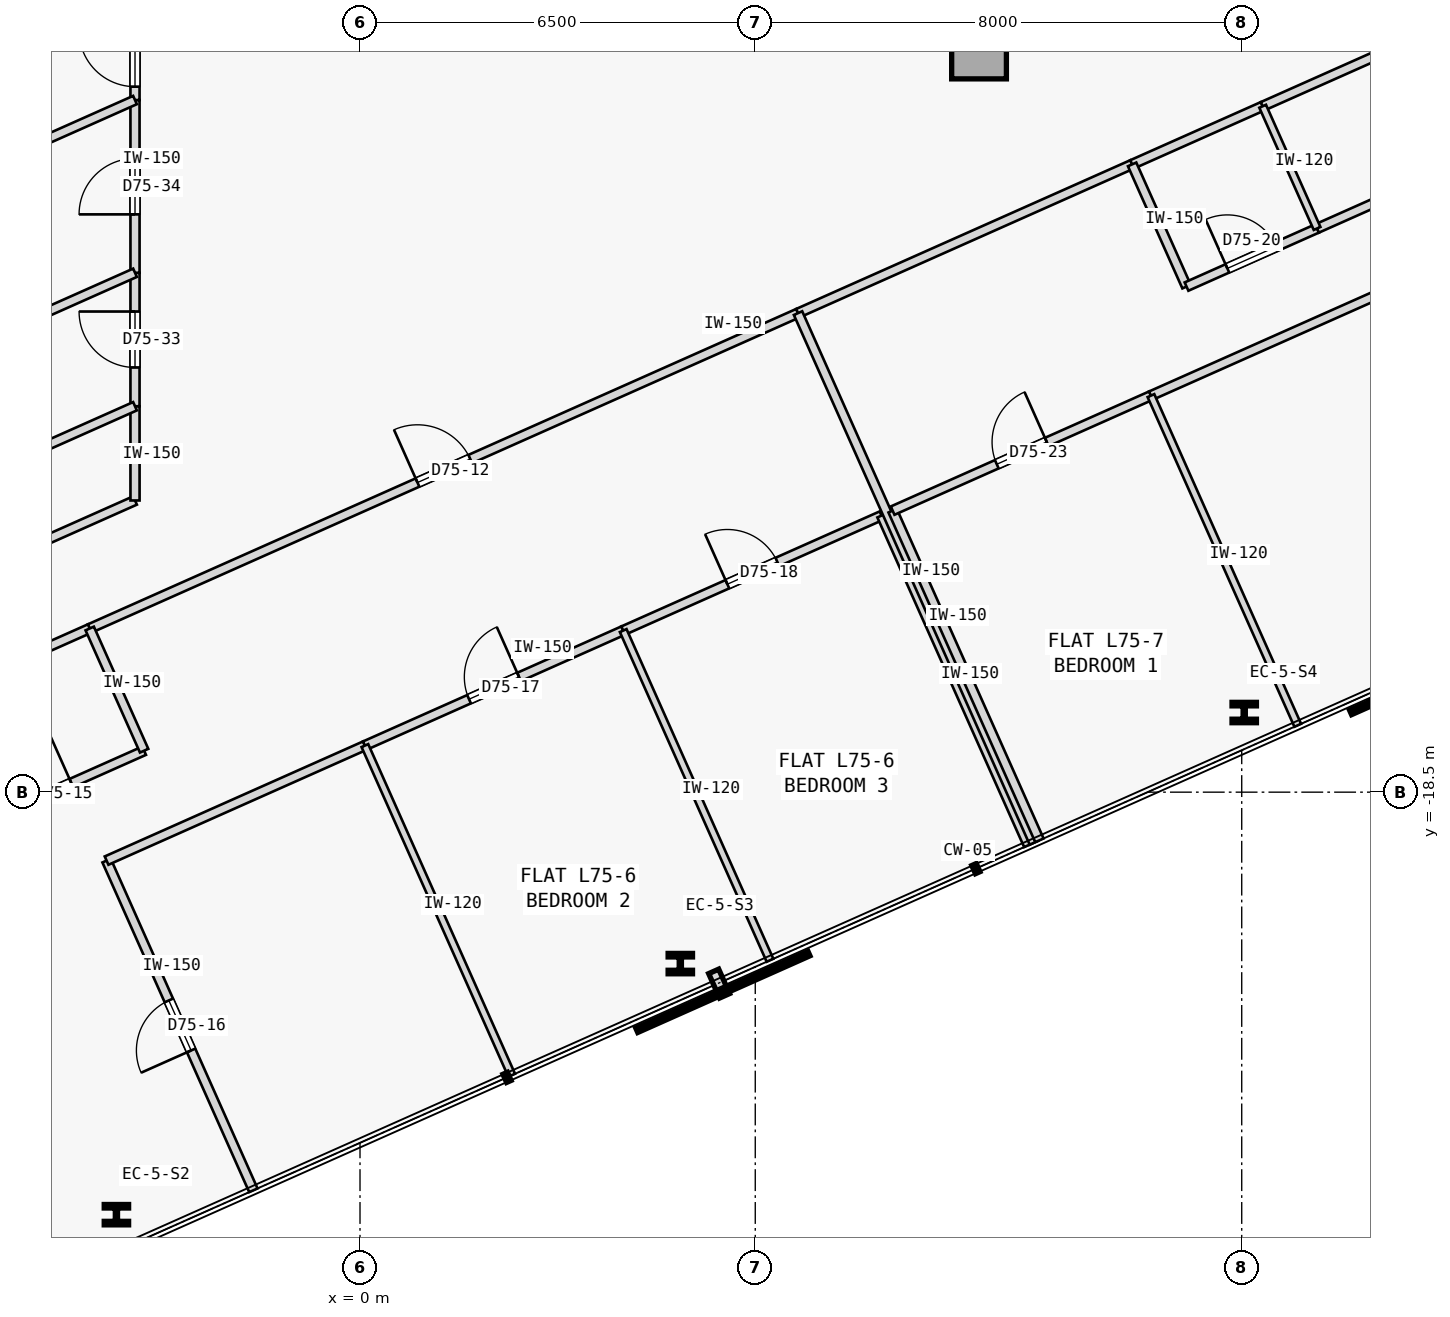
"""IFC4 building model, lengths in metres.
Left out: names, types, materials, properties, quantities, classifications, styles, units other than length and angle.
Written with IfcOpenShell. Run it as: python <this file> out.ifc"""

import sys

from ifc_helpers import new_model, si_unit, direction, frame, frame_2d, origin, origin_2d, place, context, subcontext, project, spatial, rectangle, i_section, extrude, element, fill, save


model = new_model("IFC4")
c1 = context("Model", 3, precision=1e-05, world=origin(), true_north=direction((0.0, 1.0)))
c2 = subcontext(c1, "Body", "Model", "MODEL_VIEW")
j1 = project(units=[si_unit("LENGTHUNIT", "METRE"), si_unit("PLANEANGLEUNIT", "RADIAN")], contexts=[c1])
p1 = place(None, origin())
s1 = spatial("IfcSite", under=j1, at=p1, CompositionType="ELEMENT")
p2 = place(p1, origin())
s2 = spatial("IfcBuilding", under=s1, at=p2, CompositionType="ELEMENT")
p3 = place(p2, frame((0.0, 0.0, 281.9)))
s3 = spatial("IfcBuildingStorey", under=s2, at=p3, CompositionType="ELEMENT", Elevation=281.9)
p4 = place(p3, frame((10.18, -6.32, 0.0), z_axis=(0.0, 0.0, 1.0), x_axis=(1.0, 0.0, 0.0)))
e1 = element("IfcColumn", 1, at=p4, inside=s3, PredefinedType="COLUMN", context=c2, shape_type="SweptSolid", body=[
    extrude(rectangle(XDim=0.9, YDim=0.9, at=origin_2d()), origin(), (0.0, 0.0, 1.0), 3.35),
])
for number, where, z_axis, x_axis in (
    (2, (-4.006, -25.448, 0.0), (0.0, 0.0, 1.0), (1.0, 0.0, 0.0)),
    (3, (5.268, -21.319, 0.0), (0.0, 0.0, 1.0), (1.0, 0.0, 0.0)),
    (4, (14.541, -17.19, 0.0), (0.0, 0.0, 1.0), (1.0, 0.0, 0.0)),
):
    element("IfcColumn", number, at=place(p3, frame(where, z_axis=z_axis, x_axis=x_axis)), inside=s3, PredefinedType="COLUMN", context=c2, shape_type="SweptSolid", body=[
        extrude(i_section(OverallWidth=0.401, OverallDepth=0.335, WebThickness=0.036, FlangeThickness=0.058, FilletRadius=0.015, at=origin_2d()), origin(), (0.0, 0.0, 1.0), 3.35),
    ])
p5 = place(p3, frame((-4.445, -15.808, 0.0), z_axis=(0.0, 0.0, 1.0), x_axis=(0.913546853922, 0.406733506966, 0.0)))
e5 = element("IfcWall", 5, at=p5, inside=s3, PredefinedType="PARTITIONING", context=c2, shape_type="SweptSolid", body=[
    extrude(rectangle(XDim=12.751, YDim=0.15, at=frame_2d((6.375, 0.0))), origin(), (0.0, 0.0, 1.0), 3.125),
])
p6 = place(p5, frame((5.9, 0.0, 0.0)))
e6 = element("IfcOpeningElement", 6, at=p6, cuts=e5, PredefinedType="OPENING", context=c2, shape_type="SweptSolid", body=[
    extrude(rectangle(XDim=0.95, YDim=2.15, at=frame_2d((0.475, 1.075))), frame((0.0, 0.085, 0.0), z_axis=(0.0, -1.0, 0.0), x_axis=(1.0, 0.0, 0.0)), (0.0, 0.0, 1.0), 0.17),
])
p7 = place(p3, frame((-7.643, -17.232, 0.0), z_axis=(0.0, 0.0, 1.0), x_axis=(0.913549606868, 0.406727323635, 0.0)))
e7 = element("IfcWall", 7, at=p7, inside=s3, PredefinedType="PARTITIONING", context=c2, shape_type="SweptSolid", body=[
    extrude(rectangle(XDim=3.5, YDim=0.15, at=frame_2d((1.75, 0.0))), origin(), (0.0, 0.0, 1.0), 3.125),
])
p8 = place(p3, frame((7.204, -10.622, 0.0), z_axis=(0.0, 0.0, 1.0), x_axis=(0.913545172627, 0.406737283231, 0.0)))
e8 = element("IfcWall", 8, at=p8, inside=s3, PredefinedType="PARTITIONING", context=c2, shape_type="SweptSolid", body=[
    extrude(rectangle(XDim=6.014, YDim=0.15, at=frame_2d((3.007, 0.0))), origin(), (0.0, 0.0, 1.0), 3.125),
])
p9 = place(p3, frame((12.698, -8.176, 0.0), z_axis=(0.0, 0.0, 1.0), x_axis=(0.913558622212, 0.406707073682, 0.0)))
e9 = element("IfcWall", 9, at=p9, inside=s3, PredefinedType="PARTITIONING", context=c2, shape_type="SweptSolid", body=[
    extrude(rectangle(XDim=2.35, YDim=0.15, at=frame_2d((1.175, 0.0))), origin(), (0.0, 0.0, 1.0), 3.125),
])
p10 = place(p3, frame((14.844, -7.22, 0.0), z_axis=(0.0, 0.0, 1.0), x_axis=(0.913524337797, 0.406784075711, 0.0)))
e10 = element("IfcWall", 10, at=p10, inside=s3, PredefinedType="PARTITIONING", context=c2, shape_type="SweptSolid", body=[
    extrude(rectangle(XDim=4.35, YDim=0.15, at=frame_2d((2.175, 0.0))), origin(), (0.0, 0.0, 1.0), 3.125),
])
p11 = place(p3, frame((-9.702, -16.375, 0.0), z_axis=(0.0, 0.0, 1.0), x_axis=(0.913552389019, 0.406721074594, 0.0)))
e11 = element("IfcWall", 11, at=p11, inside=s3, PredefinedType="PARTITIONING", context=c2, shape_type="SweptSolid", body=[
    extrude(rectangle(XDim=6.57, YDim=0.15, at=frame_2d((3.285, 0.0))), origin(), (0.0, 0.0, 1.0), 3.125),
])
p12 = place(p11, frame((2.825, 0.0, 0.0)))
e12 = element("IfcOpeningElement", 12, at=p12, cuts=e11, PredefinedType="OPENING", context=c2, shape_type="SweptSolid", body=[
    extrude(rectangle(XDim=0.92, YDim=2.15, at=frame_2d((0.46, 1.075))), frame((0.0, 0.085, 0.0), z_axis=(0.0, -1.0, 0.0), x_axis=(1.0, 0.0, 0.0)), (0.0, 0.0, 1.0), 0.17),
])
p13 = place(p3, frame((-3.7, -13.703, 0.0), z_axis=(0.0, 0.0, 1.0), x_axis=(-0.000157529929, 0.999999987592, 0.0)))
e13 = element("IfcWall", 13, at=p13, inside=s3, PredefinedType="PARTITIONING", context=c2, shape_type="SweptSolid", body=[
    extrude(rectangle(XDim=1.55, YDim=0.15, at=frame_2d((0.775, 0.0))), origin(), (0.0, 0.0, 1.0), 3.125),
])
p14 = place(p3, frame((-3.7, -12.154, 0.0), z_axis=(0.0, 0.0, 1.0), x_axis=(0.000111222333, 0.999999993815, 0.0)))
e14 = element("IfcWall", 14, at=p14, inside=s3, PredefinedType="PARTITIONING", context=c2, shape_type="SweptSolid", body=[
    extrude(rectangle(XDim=2.195, YDim=0.15, at=frame_2d((1.098, 0.0))), origin(), (0.0, 0.0, 1.0), 3.125),
])
p15 = place(p14, frame((0.637, 0.0, 0.0)))
e15 = element("IfcOpeningElement", 15, at=p15, cuts=e14, PredefinedType="OPENING", context=c2, shape_type="SweptSolid", body=[
    extrude(rectangle(XDim=0.92, YDim=2.15, at=frame_2d((0.46, 1.075))), frame((0.0, 0.085, 0.0), z_axis=(0.0, -1.0, 0.0), x_axis=(1.0, 0.0, 0.0)), (0.0, 0.0, 1.0), 0.17),
])
p16 = place(p3, frame((-3.7, -9.958, 0.0), z_axis=(0.0, 0.0, 1.0), x_axis=(-0.000171909917, 0.999999985223, 0.0)))
e16 = element("IfcWall", 16, at=p16, inside=s3, PredefinedType="PARTITIONING", context=c2, shape_type="SweptSolid", body=[
    extrude(rectangle(XDim=2.84, YDim=0.15, at=frame_2d((1.42, 0.0))), origin(), (0.0, 0.0, 1.0), 3.125),
])
p17 = place(p16, frame((0.96, 0.0, 0.0)))
e17 = element("IfcOpeningElement", 17, at=p17, cuts=e16, PredefinedType="OPENING", context=c2, shape_type="SweptSolid", body=[
    extrude(rectangle(XDim=0.92, YDim=2.15, at=frame_2d((0.46, 1.075))), frame((0.0, 0.085, 0.0), z_axis=(0.0, -1.0, 0.0), x_axis=(1.0, 0.0, 0.0)), (0.0, 0.0, 1.0), 0.17),
])
p18 = place(p3, frame((-3.7, -7.118, 0.0), z_axis=(0.0, 0.0, 1.0), x_axis=(0.000321543392, 0.999999948305, 0.0)))
e18 = element("IfcWall", 18, at=p18, inside=s3, PredefinedType="PARTITIONING", context=c2, shape_type="SweptSolid", body=[
    extrude(rectangle(XDim=1.519, YDim=0.15, at=frame_2d((0.759, 0.0))), origin(), (0.0, 0.0, 1.0), 3.125),
])
p19 = place(p18, frame((0.22, 0.0, 0.0)))
e19 = element("IfcOpeningElement", 19, at=p19, cuts=e18, PredefinedType="OPENING", context=c2, shape_type="SweptSolid", body=[
    extrude(rectangle(XDim=0.92, YDim=2.15, at=frame_2d((0.46, 1.075))), frame((0.0, 0.085, 0.0), z_axis=(0.0, -1.0, 0.0), x_axis=(1.0, 0.0, 0.0)), (0.0, 0.0, 1.0), 0.17),
])
p20 = place(p3, frame((-6.748, -19.242, 0.0), z_axis=(0.0, 0.0, 1.0), x_axis=(0.913549606868, 0.406727323635, 0.0)))
e20 = element("IfcWall", 20, at=p20, inside=s3, PredefinedType="PARTITIONING", context=c2, shape_type="SweptSolid", body=[
    extrude(rectangle(XDim=3.5, YDim=0.15, at=frame_2d((1.75, 0.0))), origin(), (0.0, 0.0, 1.0), 3.125),
])
p21 = place(p20, frame((1.31, 0.0, 0.0)))
e21 = element("IfcOpeningElement", 21, at=p21, cuts=e20, PredefinedType="OPENING", context=c2, shape_type="SweptSolid", body=[
    extrude(rectangle(XDim=0.88, YDim=2.15, at=frame_2d((0.44, 1.075))), frame((0.0, 0.085, 0.0), z_axis=(0.0, -1.0, 0.0), x_axis=(1.0, 0.0, 0.0)), (0.0, 0.0, 1.0), 0.17),
])
p22 = place(p3, frame((-3.55, -17.818, 0.0), z_axis=(0.0, 0.0, 1.0), x_axis=(-0.406725294076, 0.913550510459, 0.0)))
e22 = element("IfcWall", 22, at=p22, inside=s3, PredefinedType="PARTITIONING", context=c2, shape_type="SweptSolid", body=[
    extrude(rectangle(XDim=2.2, YDim=0.15, at=frame_2d((1.1, 0.0))), origin(), (0.0, 0.0, 1.0), 3.125),
])
p23 = place(p3, frame((-1.754, -25.047, 0.0), z_axis=(0.0, 0.0, 1.0), x_axis=(-0.406714717734, 0.913555219119, 0.0)))
e23 = element("IfcWall", 23, at=p23, inside=s3, PredefinedType="PARTITIONING", context=c2, shape_type="SweptSolid", body=[
    extrude(rectangle(XDim=5.935, YDim=0.15, at=frame_2d((2.967, 0.0))), origin(), (0.0, 0.0, 1.0), 3.125),
])
p24 = place(p23, frame((2.518, 0.0, 0.0)))
e24 = element("IfcOpeningElement", 24, at=p24, cuts=e23, PredefinedType="OPENING", context=c2, shape_type="SweptSolid", body=[
    extrude(rectangle(XDim=0.9, YDim=2.15, at=frame_2d((0.45, 1.075))), frame((0.0, 0.085, 0.0), z_axis=(0.0, -1.0, 0.0), x_axis=(1.0, 0.0, 0.0)), (0.0, 0.0, 1.0), 0.17),
])
p25 = place(p3, frame((-4.167, -19.625, 0.0), z_axis=(0.0, 0.0, 1.0), x_axis=(0.913536363976, 0.406757067172, 0.0)))
e25 = element("IfcWall", 25, at=p25, inside=s3, PredefinedType="PARTITIONING", context=c2, shape_type="SweptSolid", body=[
    extrude(rectangle(XDim=4.65, YDim=0.15, at=frame_2d((2.325, 0.0))), origin(), (0.0, 0.0, 1.0), 3.125),
])
p26 = place(p3, frame((0.08, -17.734, 0.0), z_axis=(0.0, 0.0, 1.0), x_axis=(0.91354505039, 0.40673755778, 0.0)))
e26 = element("IfcWall", 26, at=p26, inside=s3, PredefinedType="PARTITIONING", context=c2, shape_type="SweptSolid", body=[
    extrude(rectangle(XDim=4.65, YDim=0.15, at=frame_2d((2.325, 0.0))), origin(), (0.0, 0.0, 1.0), 3.125),
])
p27 = place(p26, frame((1.875, 0.0, 0.0)))
e27 = element("IfcOpeningElement", 27, at=p27, cuts=e26, PredefinedType="OPENING", context=c2, shape_type="SweptSolid", body=[
    extrude(rectangle(XDim=0.9, YDim=2.15, at=frame_2d((0.45, 1.075))), frame((0.0, 0.085, 0.0), z_axis=(0.0, -1.0, 0.0), x_axis=(1.0, 0.0, 0.0)), (0.0, 0.0, 1.0), 0.17),
])
p28 = place(p3, frame((4.328, -15.843, 0.0), z_axis=(0.0, 0.0, 1.0), x_axis=(0.91354505039, 0.40673755778, 0.0)))
e28 = element("IfcWall", 28, at=p28, inside=s3, PredefinedType="PARTITIONING", context=c2, shape_type="SweptSolid", body=[
    extrude(rectangle(XDim=4.65, YDim=0.15, at=frame_2d((2.325, 0.0))), origin(), (0.0, 0.0, 1.0), 3.125),
])
p29 = place(p28, frame((1.875, 0.0, 0.0)))
e29 = element("IfcOpeningElement", 29, at=p29, cuts=e28, PredefinedType="OPENING", context=c2, shape_type="SweptSolid", body=[
    extrude(rectangle(XDim=0.9, YDim=2.15, at=frame_2d((0.45, 1.075))), frame((0.0, 0.085, 0.0), z_axis=(0.0, -1.0, 0.0), x_axis=(1.0, 0.0, 0.0)), (0.0, 0.0, 1.0), 0.17),
])
p30 = place(p3, frame((10.99, -19.373, 0.0), z_axis=(0.0, 0.0, 1.0), x_axis=(-0.406749048544, 0.913539934271, 0.0)))
e30 = element("IfcWall", 30, at=p30, inside=s3, PredefinedType="PARTITIONING", context=c2, shape_type="SweptSolid", body=[
    extrude(rectangle(XDim=5.935, YDim=0.15, at=frame_2d((2.968, 0.0))), origin(), (0.0, 0.0, 1.0), 3.125),
])
p31 = place(p3, frame((11.082, -19.333, 0.0), z_axis=(0.0, 0.0, 1.0), x_axis=(-0.406729927653, 0.913548447512, 0.0)))
e31 = element("IfcWall", 31, at=p31, inside=s3, PredefinedType="PARTITIONING", context=c2, shape_type="SweptSolid", body=[
    extrude(rectangle(XDim=9.535, YDim=0.15, at=frame_2d((4.768, 0.0))), origin(), (0.0, 0.0, 1.0), 3.125),
])
for number, where, z_axis, x_axis in (
    (32, (2.494, -23.156, 0.0), (0.0, 0.0, 1.0), (-0.407, 0.914, 0.0)),
    (33, (6.742, -21.265, 0.0), (0.0, 0.0, 1.0), (-0.407, 0.914, 0.0)),
):
    element("IfcWall", number, at=place(p3, frame(where, z_axis=z_axis, x_axis=x_axis)), inside=s3, PredefinedType="PARTITIONING", context=c2, shape_type="SweptSolid", body=[
        extrude(rectangle(XDim=5.935, YDim=0.12, at=frame_2d((2.968, 0.0))), origin(), (0.0, 0.0, 1.0), 3.125),
    ])
p32 = place(p3, frame((13.592, -10.186, 0.0), z_axis=(0.0, 0.0, 1.0), x_axis=(-0.406725294076, 0.913550510459, 0.0)))
e34 = element("IfcWall", 34, at=p32, inside=s3, PredefinedType="PARTITIONING", context=c2, shape_type="SweptSolid", body=[
    extrude(rectangle(XDim=2.2, YDim=0.15, at=frame_2d((1.1, 0.0))), origin(), (0.0, 0.0, 1.0), 3.125),
])
p33 = place(p3, frame((13.592, -10.186, 0.0), z_axis=(0.0, 0.0, 1.0), x_axis=(0.913558622212, 0.406707073682, 0.0)))
e35 = element("IfcWall", 35, at=p33, inside=s3, PredefinedType="PARTITIONING", context=c2, shape_type="SweptSolid", body=[
    extrude(rectangle(XDim=2.35, YDim=0.15, at=frame_2d((1.175, 0.0))), origin(), (0.0, 0.0, 1.0), 3.125),
])
p34 = place(p33, frame((0.735, 0.0, 0.0)))
e36 = element("IfcOpeningElement", 36, at=p34, cuts=e35, PredefinedType="OPENING", context=c2, shape_type="SweptSolid", body=[
    extrude(rectangle(XDim=0.88, YDim=2.15, at=frame_2d((0.44, 1.075))), frame((0.0, 0.085, 0.0), z_axis=(0.0, -1.0, 0.0), x_axis=(1.0, 0.0, 0.0)), (0.0, 0.0, 1.0), 0.17),
])
p35 = place(p3, frame((15.739, -9.23, 0.0), z_axis=(0.0, 0.0, 1.0), x_axis=(0.913545193015, 0.406737237438, 0.0)))
e37 = element("IfcWall", 37, at=p35, inside=s3, PredefinedType="PARTITIONING", context=c2, shape_type="SweptSolid", body=[
    extrude(rectangle(XDim=4.35, YDim=0.15, at=frame_2d((2.175, 0.0))), origin(), (0.0, 0.0, 1.0), 3.125),
])
p36 = place(p35, frame((1.725, 0.0, 0.0)))
e38 = element("IfcOpeningElement", 38, at=p36, cuts=e37, PredefinedType="OPENING", context=c2, shape_type="SweptSolid", body=[
    extrude(rectangle(XDim=0.9, YDim=2.15, at=frame_2d((0.45, 1.075))), frame((0.0, 0.085, 0.0), z_axis=(0.0, -1.0, 0.0), x_axis=(1.0, 0.0, 0.0)), (0.0, 0.0, 1.0), 0.17),
])
p37 = place(p3, frame((11.173, -19.292, 0.0), z_axis=(0.0, 0.0, 1.0), x_axis=(-0.406749048544, 0.913539934271, 0.0)))
e39 = element("IfcWall", 39, at=p37, inside=s3, PredefinedType="PARTITIONING", context=c2, shape_type="SweptSolid", body=[
    extrude(rectangle(XDim=5.935, YDim=0.15, at=frame_2d((2.968, 0.0))), origin(), (0.0, 0.0, 1.0), 3.125),
])
p38 = place(p3, frame((8.759, -13.87, 0.0), z_axis=(0.0, 0.0, 1.0), x_axis=(0.91354505039, 0.40673755778, 0.0)))
e40 = element("IfcWall", 40, at=p38, inside=s3, PredefinedType="PARTITIONING", context=c2, shape_type="SweptSolid", body=[
    extrude(rectangle(XDim=4.65, YDim=0.15, at=frame_2d((2.325, 0.0))), origin(), (0.0, 0.0, 1.0), 3.125),
])
p39 = place(p38, frame((1.875, 0.0, 0.0)))
e41 = element("IfcOpeningElement", 41, at=p39, cuts=e40, PredefinedType="OPENING", context=c2, shape_type="SweptSolid", body=[
    extrude(rectangle(XDim=0.9, YDim=2.15, at=frame_2d((0.45, 1.075))), frame((0.0, 0.085, 0.0), z_axis=(0.0, -1.0, 0.0), x_axis=(1.0, 0.0, 0.0)), (0.0, 0.0, 1.0), 0.17),
])
p40 = place(p3, frame((13.007, -11.979, 0.0), z_axis=(0.0, 0.0, 1.0), x_axis=(0.91354505039, 0.40673755778, 0.0)))
e42 = element("IfcWall", 42, at=p40, inside=s3, PredefinedType="PARTITIONING", context=c2, shape_type="SweptSolid", body=[
    extrude(rectangle(XDim=4.65, YDim=0.15, at=frame_2d((2.325, 0.0))), origin(), (0.0, 0.0, 1.0), 3.125),
])
p41 = place(p3, frame((15.739, -9.23, 0.0), z_axis=(0.0, 0.0, 1.0), x_axis=(-0.406725294076, 0.913550510459, 0.0)))
e43 = element("IfcWall", 43, at=p41, inside=s3, PredefinedType="PARTITIONING", context=c2, shape_type="SweptSolid", body=[
    extrude(rectangle(XDim=2.2, YDim=0.12, at=frame_2d((1.1, 0.0))), origin(), (0.0, 0.0, 1.0), 3.125),
])
p42 = place(p3, frame((15.421, -17.401, 0.0), z_axis=(0.0, 0.0, 1.0), x_axis=(-0.406749048544, 0.913539934271, 0.0)))
e44 = element("IfcWall", 44, at=p42, inside=s3, PredefinedType="PARTITIONING", context=c2, shape_type="SweptSolid", body=[
    extrude(rectangle(XDim=5.935, YDim=0.12, at=frame_2d((2.968, 0.0))), origin(), (0.0, 0.0, 1.0), 3.125),
])
p43 = place(p3, frame((-10.278, -15.082, 0.0), z_axis=(0.0, 0.0, 1.0), x_axis=(0.913549882956, 0.406726703513, 0.0)))
e45 = element("IfcWall", 45, at=p43, inside=s3, PredefinedType="PARTITIONING", context=c2, shape_type="SweptSolid", body=[
    extrude(rectangle(XDim=7.2, YDim=0.15, at=frame_2d((3.6, 0.0))), origin(), (0.0, 0.0, 1.0), 3.125),
])
p44 = place(p3, frame((-11.093, -13.25, 0.0), z_axis=(0.0, 0.0, 1.0), x_axis=(0.913543891457, 0.406740160767, 0.0)))
e46 = element("IfcWall", 46, at=p44, inside=s3, PredefinedType="PARTITIONING", context=c2, shape_type="SweptSolid", body=[
    extrude(rectangle(XDim=8.093, YDim=0.15, at=frame_2d((4.046, 0.0))), origin(), (0.0, 0.0, 1.0), 3.125),
])
p45 = place(p3, frame((-12.149, -10.88, 0.0), z_axis=(0.0, 0.0, 1.0), x_axis=(0.913542450291, 0.406743397631, 0.0)))
e47 = element("IfcWall", 47, at=p45, inside=s3, PredefinedType="PARTITIONING", context=c2, shape_type="SweptSolid", body=[
    extrude(rectangle(XDim=9.248, YDim=0.15, at=frame_2d((4.624, 0.0))), origin(), (0.0, 0.0, 1.0), 3.125),
])
p46 = place(p6, origin())
e48 = element("IfcDoor", 48, at=p46, inside=s3, OperationType="SINGLE_SWING_LEFT", PredefinedType="DOOR", context=c2, shape_type="SweptSolid", body=[
    extrude(rectangle(XDim=0.95, YDim=2.15, at=frame_2d((0.475, 1.075))), frame((0.0, 0.025, 0.0), z_axis=(0.0, -1.0, 0.0), x_axis=(1.0, 0.0, 0.0)), (0.0, 0.0, 1.0), 0.05),
])
fill(e6, e48)
p47 = place(p21, origin())
e49 = element("IfcDoor", 49, at=p47, inside=s3, OperationType="SINGLE_SWING_RIGHT", PredefinedType="DOOR", context=c2, shape_type="SweptSolid", body=[
    extrude(rectangle(XDim=0.88, YDim=2.15, at=frame_2d((0.44, 1.075))), frame((0.0, 0.025, 0.0), z_axis=(0.0, -1.0, 0.0), x_axis=(1.0, 0.0, 0.0)), (0.0, 0.0, 1.0), 0.05),
])
fill(e21, e49)
p48 = place(p24, origin())
e50 = element("IfcDoor", 50, at=p48, inside=s3, OperationType="SINGLE_SWING_LEFT", PredefinedType="DOOR", context=c2, shape_type="SweptSolid", body=[
    extrude(rectangle(XDim=0.9, YDim=2.15, at=frame_2d((0.45, 1.075))), frame((0.0, 0.025, 0.0), z_axis=(0.0, -1.0, 0.0), x_axis=(1.0, 0.0, 0.0)), (0.0, 0.0, 1.0), 0.05),
])
fill(e24, e50)
p49 = place(p27, origin())
e51 = element("IfcDoor", 51, at=p49, inside=s3, OperationType="SINGLE_SWING_RIGHT", PredefinedType="DOOR", context=c2, shape_type="SweptSolid", body=[
    extrude(rectangle(XDim=0.9, YDim=2.15, at=frame_2d((0.45, 1.075))), frame((0.0, 0.025, 0.0), z_axis=(0.0, -1.0, 0.0), x_axis=(1.0, 0.0, 0.0)), (0.0, 0.0, 1.0), 0.05),
])
fill(e27, e51)
p50 = place(p29, origin())
e52 = element("IfcDoor", 52, at=p50, inside=s3, OperationType="SINGLE_SWING_LEFT", PredefinedType="DOOR", context=c2, shape_type="SweptSolid", body=[
    extrude(rectangle(XDim=0.9, YDim=2.15, at=frame_2d((0.45, 1.075))), frame((0.0, 0.025, 0.0), z_axis=(0.0, -1.0, 0.0), x_axis=(1.0, 0.0, 0.0)), (0.0, 0.0, 1.0), 0.05),
])
fill(e29, e52)
p51 = place(p34, origin())
e53 = element("IfcDoor", 53, at=p51, inside=s3, OperationType="SINGLE_SWING_LEFT", PredefinedType="DOOR", context=c2, shape_type="SweptSolid", body=[
    extrude(rectangle(XDim=0.88, YDim=2.15, at=frame_2d((0.44, 1.075))), frame((0.0, 0.025, 0.0), z_axis=(0.0, -1.0, 0.0), x_axis=(1.0, 0.0, 0.0)), (0.0, 0.0, 1.0), 0.05),
])
fill(e36, e53)
p52 = place(p39, origin())
e54 = element("IfcDoor", 54, at=p52, inside=s3, OperationType="SINGLE_SWING_RIGHT", PredefinedType="DOOR", context=c2, shape_type="SweptSolid", body=[
    extrude(rectangle(XDim=0.9, YDim=2.15, at=frame_2d((0.45, 1.075))), frame((0.0, 0.025, 0.0), z_axis=(0.0, -1.0, 0.0), x_axis=(1.0, 0.0, 0.0)), (0.0, 0.0, 1.0), 0.05),
])
fill(e41, e54)
p53 = place(p15, origin())
e55 = element("IfcDoor", 55, at=p53, inside=s3, OperationType="SINGLE_SWING_RIGHT", PredefinedType="DOOR", context=c2, shape_type="SweptSolid", body=[
    extrude(rectangle(XDim=0.92, YDim=2.15, at=frame_2d((0.46, 1.075))), frame((0.0, 0.025, 0.0), z_axis=(0.0, -1.0, 0.0), x_axis=(1.0, 0.0, 0.0)), (0.0, 0.0, 1.0), 0.05),
])
fill(e15, e55)
p54 = place(p17, origin())
e56 = element("IfcDoor", 56, at=p54, inside=s3, OperationType="SINGLE_SWING_LEFT", PredefinedType="DOOR", context=c2, shape_type="SweptSolid", body=[
    extrude(rectangle(XDim=0.92, YDim=2.15, at=frame_2d((0.46, 1.075))), frame((0.0, 0.025, 0.0), z_axis=(0.0, -1.0, 0.0), x_axis=(1.0, 0.0, 0.0)), (0.0, 0.0, 1.0), 0.05),
])
fill(e17, e56)
p55 = place(p19, origin())
e57 = element("IfcDoor", 57, at=p55, inside=s3, OperationType="SINGLE_SWING_RIGHT", PredefinedType="DOOR", context=c2, shape_type="SweptSolid", body=[
    extrude(rectangle(XDim=0.92, YDim=2.15, at=frame_2d((0.46, 1.075))), frame((0.0, 0.025, 0.0), z_axis=(0.0, -1.0, 0.0), x_axis=(1.0, 0.0, 0.0)), (0.0, 0.0, 1.0), 0.05),
])
fill(e19, e57)
save(model, sys.argv[1])
